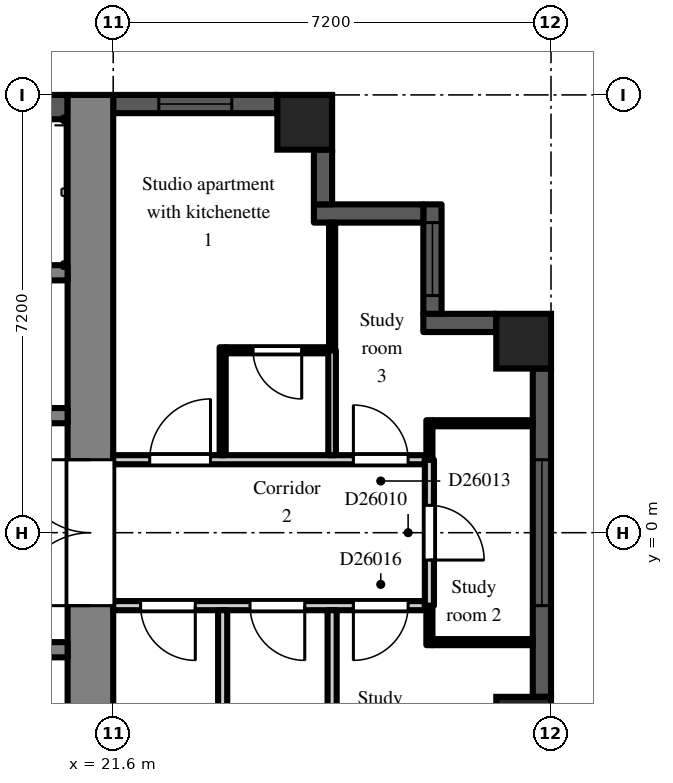
"""IFC4 building model, lengths in metres.
Left out: names, types, materials, properties, quantities, classifications, styles, units other than length and angle.
Written with IfcOpenShell. Run it as: python <this file> out.ifc"""

import sys

from ifc_helpers import new_model, si_unit, direction, frame, frame_2d, origin, origin_2d, place, context, subcontext, project, spatial, rectangle, extrude, element, fill, save


model = new_model("IFC4")
c1 = context("Model", 3, precision=1e-05, world=origin(), true_north=direction((0.0, 1.0)))
c2 = subcontext(c1, "Body", "Model", "MODEL_VIEW")
j1 = project(units=[si_unit("LENGTHUNIT", "METRE"), si_unit("PLANEANGLEUNIT", "RADIAN")], contexts=[c1])
p1 = place(None, origin())
s1 = spatial("IfcSite", under=j1, at=p1, CompositionType="ELEMENT")
p2 = place(p1, origin())
s2 = spatial("IfcBuilding", under=s1, at=p2, CompositionType="ELEMENT")
p3 = place(p2, frame((0.0, 0.0, 179.7)))
s3 = spatial("IfcBuildingStorey", under=s2, at=p3, CompositionType="ELEMENT", Elevation=179.7)
for number, where, z_axis, x_axis in (
    (1, (24.75, 6.75, 0.0), (0.0, 0.0, 1.0), (1.0, 0.0, 0.0)),
    (2, (28.35, -3.15, 0.0), (0.0, 0.0, 1.0), (1.0, 0.0, 0.0)),
    (3, (28.35, 3.15, 0.0), (0.0, 0.0, 1.0), (1.0, 0.0, 0.0)),
):
    element("IfcColumn", number, at=place(p3, frame(where, z_axis=z_axis, x_axis=x_axis)), inside=s3, PredefinedType="COLUMN", context=c2, shape_type="SweptSolid", body=[
        extrude(rectangle(XDim=0.9, YDim=0.9, at=origin_2d()), origin(), (0.0, 0.0, 1.0), 3.0),
    ])
p4 = place(p3, frame((28.65, -2.7, 0.0), z_axis=(0.0, 0.0, 1.0), x_axis=(0.0, 1.0, 0.0)))
e4 = element("IfcWall", 4, at=p4, inside=s3, PredefinedType="SOLIDWALL", context=c2, shape_type="SweptSolid", body=[
    extrude(rectangle(XDim=5.4, YDim=0.3, at=frame_2d((2.7, 0.0))), origin(), (0.0, 0.0, 1.0), 2.2),
])
p5 = place(p4, frame((1.5, 0.0, 0.2)))
e5 = element("IfcOpeningElement", 5, at=p5, cuts=e4, PredefinedType="OPENING", context=c2, shape_type="SweptSolid", body=[
    extrude(rectangle(XDim=2.4, YDim=1.85, at=frame_2d((1.2, 0.925))), frame((0.0, 0.16, 0.0), z_axis=(0.0, -1.0, 0.0), x_axis=(1.0, 0.0, 0.0)), (0.0, 0.0, 1.0), 0.32),
])
p6 = place(p3, frame((27.9, 3.45, 0.0), z_axis=(0.0, 0.0, 1.0), x_axis=(-1.0, 0.0, 0.0)))
e6 = element("IfcWall", 6, at=p6, inside=s3, PredefinedType="SOLIDWALL", context=c2, shape_type="SweptSolid", body=[
    extrude(rectangle(XDim=1.2, YDim=0.3, at=frame_2d((0.6, 0.0))), origin(), (0.0, 0.0, 1.0), 2.6),
])
p7 = place(p3, frame((26.85, 3.6, 0.0), z_axis=(0.0, 0.0, 1.0), x_axis=(0.0, 1.0, 0.0)))
e7 = element("IfcWall", 7, at=p7, inside=s3, PredefinedType="SOLIDWALL", context=c2, shape_type="SweptSolid", body=[
    extrude(rectangle(XDim=1.8, YDim=0.3, at=frame_2d((0.9, 0.0))), origin(), (0.0, 0.0, 1.0), 2.6),
])
p8 = place(p7, frame((0.3, 0.0, 0.2)))
e8 = element("IfcOpeningElement", 8, at=p8, cuts=e7, PredefinedType="OPENING", context=c2, shape_type="SweptSolid", body=[
    extrude(rectangle(XDim=1.2, YDim=1.85, at=frame_2d((0.6, 0.925))), frame((0.0, 0.16, 0.0), z_axis=(0.0, -1.0, 0.0), x_axis=(1.0, 0.0, 0.0)), (0.0, 0.0, 1.0), 0.32),
])
p9 = place(p3, frame((26.7, 5.25, 0.0), z_axis=(0.0, 0.0, 1.0), x_axis=(-1.0, 0.0, 0.0)))
e9 = element("IfcWall", 9, at=p9, inside=s3, PredefinedType="SOLIDWALL", context=c2, shape_type="SweptSolid", body=[
    extrude(rectangle(XDim=1.8, YDim=0.3, at=frame_2d((0.9, 0.0))), origin(), (0.0, 0.0, 1.0), 2.6),
])
p10 = place(p3, frame((25.05, 5.4, 0.0), z_axis=(0.0, 0.0, 1.0), x_axis=(0.0, 1.0, 0.0)))
e10 = element("IfcWall", 10, at=p10, inside=s3, PredefinedType="SOLIDWALL", context=c2, shape_type="SweptSolid", body=[
    extrude(rectangle(XDim=0.9, YDim=0.3, at=frame_2d((0.45, 0.0))), origin(), (0.0, 0.0, 1.0), 2.6),
])
p11 = place(p3, frame((24.3, 7.05, 0.0), z_axis=(0.0, 0.0, 1.0), x_axis=(-1.0, 0.0, 0.0)))
e11 = element("IfcWall", 11, at=p11, inside=s3, PredefinedType="SOLIDWALL", context=c2, shape_type="SweptSolid", body=[
    extrude(rectangle(XDim=2.7, YDim=0.3, at=frame_2d((1.35, 0.0))), origin(), (0.0, 0.0, 1.0), 2.2),
])
p12 = place(p11, frame((0.75, 0.0, 0.2)))
e12 = element("IfcOpeningElement", 12, at=p12, cuts=e11, PredefinedType="OPENING", context=c2, shape_type="SweptSolid", body=[
    extrude(rectangle(XDim=1.2, YDim=1.85, at=frame_2d((0.6, 0.925))), frame((0.0, 0.16, 0.0), z_axis=(0.0, -1.0, 0.0), x_axis=(1.0, 0.0, 0.0)), (0.0, 0.0, 1.0), 0.32),
])
p13 = place(p3, frame((21.225, -7.2, 0.0), z_axis=(0.0, 0.0, 1.0), x_axis=(0.0, 1.0, 0.0)))
e13 = element("IfcWall", 13, at=p13, inside=s3, PredefinedType="SHEAR", context=c2, shape_type="SweptSolid", body=[
    extrude(rectangle(XDim=14.4, YDim=0.75, at=frame_2d((7.2, 0.0))), origin(), (0.0, 0.0, 1.0), 2.6),
])
p14 = place(p13, frame((6.0, 0.0, 0.0)))
e14 = element("IfcOpeningElement", 14, at=p14, cuts=e13, PredefinedType="OPENING", context=c2, shape_type="SweptSolid", body=[
    extrude(rectangle(XDim=2.4, YDim=2.2, at=frame_2d((1.2, 1.1))), frame((0.0, 0.385, 0.0), z_axis=(0.0, -1.0, 0.0), x_axis=(1.0, 0.0, 0.0)), (0.0, 0.0, 1.0), 0.77),
])
p15 = place(p3, frame((7.9, 7.0, 0.0), z_axis=(0.0, 0.0, 1.0), x_axis=(1.0, 0.0, 0.0)))
e15 = element("IfcWall", 15, at=p15, inside=s3, PredefinedType="SHEAR", context=c2, shape_type="SweptSolid", body=[
    extrude(rectangle(XDim=12.95, YDim=0.4, at=frame_2d((6.475, 0.0))), origin(), (0.0, 0.0, 1.0), 2.6),
])
p16 = place(p3, frame((7.9, 1.925, 0.0), z_axis=(0.0, 0.0, 1.0), x_axis=(1.0, 0.0, 0.0)))
e16 = element("IfcWall", 16, at=p16, inside=s3, PredefinedType="SHEAR", context=c2, shape_type="SweptSolid", body=[
    extrude(rectangle(XDim=12.95, YDim=0.25, at=frame_2d((6.475, 0.0))), origin(), (0.0, 0.0, 1.0), 2.6),
])
p17 = place(p16, frame((4.825, 0.0, 0.0)))
e17 = element("IfcOpeningElement", 17, at=p17, cuts=e16, PredefinedType="OPENING", context=c2, shape_type="SweptSolid", body=[
    extrude(rectangle(XDim=1.1, YDim=2.1, at=frame_2d((0.55, 1.05))), frame((0.0, 0.135, 0.0), z_axis=(0.0, -1.0, 0.0), x_axis=(1.0, 0.0, 0.0)), (0.0, 0.0, 1.0), 0.27),
])
p18 = place(p16, frame((7.025, 0.0, 0.0)))
e18 = element("IfcOpeningElement", 18, at=p18, cuts=e16, PredefinedType="OPENING", context=c2, shape_type="SweptSolid", body=[
    extrude(rectangle(XDim=1.1, YDim=2.1, at=frame_2d((0.55, 1.05))), frame((0.0, 0.135, 0.0), z_axis=(0.0, -1.0, 0.0), x_axis=(1.0, 0.0, 0.0)), (0.0, 0.0, 1.0), 0.27),
])
p19 = place(p16, frame((9.225, 0.0, 0.0)))
e19 = element("IfcOpeningElement", 19, at=p19, cuts=e16, PredefinedType="OPENING", context=c2, shape_type="SweptSolid", body=[
    extrude(rectangle(XDim=1.1, YDim=2.1, at=frame_2d((0.55, 1.05))), frame((0.0, 0.135, 0.0), z_axis=(0.0, -1.0, 0.0), x_axis=(1.0, 0.0, 0.0)), (0.0, 0.0, 1.0), 0.27),
])
p20 = place(p16, frame((0.525, 0.0, 0.0)))
e20 = element("IfcOpeningElement", 20, at=p20, cuts=e16, PredefinedType="OPENING", context=c2, shape_type="SweptSolid", body=[
    extrude(rectangle(XDim=0.9, YDim=2.1, at=frame_2d((0.45, 1.05))), frame((0.0, 0.135, 0.0), z_axis=(0.0, -1.0, 0.0), x_axis=(1.0, 0.0, 0.0)), (0.0, 0.0, 1.0), 0.27),
])
p21 = place(p16, frame((2.625, 0.0, 0.0)))
e21 = element("IfcOpeningElement", 21, at=p21, cuts=e16, PredefinedType="OPENING", context=c2, shape_type="SweptSolid", body=[
    extrude(rectangle(XDim=1.1, YDim=2.1, at=frame_2d((0.55, 1.05))), frame((0.0, 0.135, 0.0), z_axis=(0.0, -1.0, 0.0), x_axis=(1.0, 0.0, 0.0)), (0.0, 0.0, 1.0), 0.27),
])
p22 = place(p16, frame((11.525, 0.0, 0.0)))
e22 = element("IfcOpeningElement", 22, at=p22, cuts=e16, PredefinedType="OPENING", context=c2, shape_type="SweptSolid", body=[
    extrude(rectangle(XDim=0.9, YDim=2.1, at=frame_2d((0.45, 1.05))), frame((0.0, 0.135, 0.0), z_axis=(0.0, -1.0, 0.0), x_axis=(1.0, 0.0, 0.0)), (0.0, 0.0, 1.0), 0.27),
])
p23 = place(p3, frame((12.3, 4.275, 0.0), z_axis=(0.0, 0.0, 1.0), x_axis=(1.0, 0.0, 0.0)))
e23 = element("IfcWall", 23, at=p23, inside=s3, PredefinedType="SHEAR", context=c2, shape_type="SweptSolid", body=[
    extrude(rectangle(XDim=8.55, YDim=0.25, at=frame_2d((4.275, 0.0))), origin(), (0.0, 0.0, 1.0), 2.6),
])
p24 = place(p3, frame((7.9, -1.925, 0.0), z_axis=(0.0, 0.0, 1.0), x_axis=(1.0, 0.0, 0.0)))
e24 = element("IfcWall", 24, at=p24, inside=s3, PredefinedType="SHEAR", context=c2, shape_type="SweptSolid", body=[
    extrude(rectangle(XDim=12.95, YDim=0.25, at=frame_2d((6.475, 0.0))), origin(), (0.0, 0.0, 1.0), 2.6),
])
p25 = place(p24, frame((0.525, 0.0, 0.0)))
e25 = element("IfcOpeningElement", 25, at=p25, cuts=e24, PredefinedType="OPENING", context=c2, shape_type="SweptSolid", body=[
    extrude(rectangle(XDim=0.9, YDim=2.1, at=frame_2d((0.45, 1.05))), frame((0.0, 0.135, 0.0), z_axis=(0.0, -1.0, 0.0), x_axis=(1.0, 0.0, 0.0)), (0.0, 0.0, 1.0), 0.27),
])
p26 = place(p24, frame((2.625, 0.0, 0.0)))
e26 = element("IfcOpeningElement", 26, at=p26, cuts=e24, PredefinedType="OPENING", context=c2, shape_type="SweptSolid", body=[
    extrude(rectangle(XDim=1.1, YDim=2.1, at=frame_2d((0.55, 1.05))), frame((0.0, 0.135, 0.0), z_axis=(0.0, -1.0, 0.0), x_axis=(1.0, 0.0, 0.0)), (0.0, 0.0, 1.0), 0.27),
])
p27 = place(p24, frame((4.925, 0.0, 0.0)))
e27 = element("IfcOpeningElement", 27, at=p27, cuts=e24, PredefinedType="OPENING", context=c2, shape_type="SweptSolid", body=[
    extrude(rectangle(XDim=0.9, YDim=2.1, at=frame_2d((0.45, 1.05))), frame((0.0, 0.135, 0.0), z_axis=(0.0, -1.0, 0.0), x_axis=(1.0, 0.0, 0.0)), (0.0, 0.0, 1.0), 0.27),
])
p28 = place(p24, frame((8.225, 0.0, 0.0)))
e28 = element("IfcOpeningElement", 28, at=p28, cuts=e24, PredefinedType="OPENING", context=c2, shape_type="SweptSolid", body=[
    extrude(rectangle(XDim=0.9, YDim=2.1, at=frame_2d((0.45, 1.05))), frame((0.0, 0.135, 0.0), z_axis=(0.0, -1.0, 0.0), x_axis=(1.0, 0.0, 0.0)), (0.0, 0.0, 1.0), 0.27),
])
p29 = place(p24, frame((11.525, 0.0, 0.0)))
e29 = element("IfcOpeningElement", 29, at=p29, cuts=e24, PredefinedType="OPENING", context=c2, shape_type="SweptSolid", body=[
    extrude(rectangle(XDim=0.9, YDim=2.1, at=frame_2d((0.45, 1.05))), frame((0.0, 0.135, 0.0), z_axis=(0.0, -1.0, 0.0), x_axis=(1.0, 0.0, 0.0)), (0.0, 0.0, 1.0), 0.27),
])
p30 = place(p3, frame((21.6, -1.2, 0.0), z_axis=(0.0, 0.0, 1.0), x_axis=(1.0, 0.0, 0.0)))
e30 = element("IfcWall", 30, at=p30, inside=s3, PredefinedType="PARTITIONING", context=c2, shape_type="SweptSolid", body=[
    extrude(rectangle(XDim=5.125, YDim=0.15, at=frame_2d((2.562, 0.0))), origin(), (0.0, 0.0, 1.0), 2.6),
])
p31 = place(p30, frame((0.45, 0.0, 0.0)))
e31 = element("IfcOpeningElement", 31, at=p31, cuts=e30, PredefinedType="OPENING", context=c2, shape_type="SweptSolid", body=[
    extrude(rectangle(XDim=0.9, YDim=2.1, at=frame_2d((0.45, 1.05))), frame((0.0, 0.085, 0.0), z_axis=(0.0, -1.0, 0.0), x_axis=(1.0, 0.0, 0.0)), (0.0, 0.0, 1.0), 0.17),
])
p32 = place(p30, frame((2.25, 0.0, 0.0)))
e32 = element("IfcOpeningElement", 32, at=p32, cuts=e30, PredefinedType="OPENING", context=c2, shape_type="SweptSolid", body=[
    extrude(rectangle(XDim=0.9, YDim=2.1, at=frame_2d((0.45, 1.05))), frame((0.0, 0.085, 0.0), z_axis=(0.0, -1.0, 0.0), x_axis=(1.0, 0.0, 0.0)), (0.0, 0.0, 1.0), 0.17),
])
p33 = place(p30, frame((3.95, 0.0, 0.0)))
e33 = element("IfcOpeningElement", 33, at=p33, cuts=e30, PredefinedType="OPENING", context=c2, shape_type="SweptSolid", body=[
    extrude(rectangle(XDim=0.9, YDim=2.1, at=frame_2d((0.45, 1.05))), frame((0.0, 0.085, 0.0), z_axis=(0.0, -1.0, 0.0), x_axis=(1.0, 0.0, 0.0)), (0.0, 0.0, 1.0), 0.17),
])
p34 = place(p3, frame((21.6, 1.2, 0.0), z_axis=(0.0, 0.0, 1.0), x_axis=(1.0, 0.0, 0.0)))
e34 = element("IfcWall", 34, at=p34, inside=s3, PredefinedType="PARTITIONING", context=c2, shape_type="SweptSolid", body=[
    extrude(rectangle(XDim=5.125, YDim=0.15, at=frame_2d((2.562, 0.0))), origin(), (0.0, 0.0, 1.0), 2.6),
])
p35 = place(p34, frame((0.6, 0.0, 0.0)))
e35 = element("IfcOpeningElement", 35, at=p35, cuts=e34, PredefinedType="OPENING", context=c2, shape_type="SweptSolid", body=[
    extrude(rectangle(XDim=1.0, YDim=2.1, at=frame_2d((0.5, 1.05))), frame((0.0, 0.085, 0.0), z_axis=(0.0, -1.0, 0.0), x_axis=(1.0, 0.0, 0.0)), (0.0, 0.0, 1.0), 0.17),
])
p36 = place(p34, frame((3.95, 0.0, 0.0)))
e36 = element("IfcOpeningElement", 36, at=p36, cuts=e34, PredefinedType="OPENING", context=c2, shape_type="SweptSolid", body=[
    extrude(rectangle(XDim=0.9, YDim=2.1, at=frame_2d((0.45, 1.05))), frame((0.0, 0.085, 0.0), z_axis=(0.0, -1.0, 0.0), x_axis=(1.0, 0.0, 0.0)), (0.0, 0.0, 1.0), 0.17),
])
p37 = place(p3, frame((23.4, -6.9, 0.0), z_axis=(0.0, 0.0, 1.0), x_axis=(0.0, 1.0, 0.0)))
e37 = element("IfcWall", 37, at=p37, inside=s3, PredefinedType="PARTITIONING", context=c2, shape_type="SweptSolid", body=[
    extrude(rectangle(XDim=5.625, YDim=0.15, at=frame_2d((2.812, 0.0))), origin(), (0.0, 0.0, 1.0), 2.6),
])
p38 = place(p3, frame((23.4, 1.275, 0.0), z_axis=(0.0, 0.0, 1.0), x_axis=(0.0, 1.0, 0.0)))
e38 = element("IfcWall", 38, at=p38, inside=s3, PredefinedType="PARTITIONING", context=c2, shape_type="SweptSolid", body=[
    extrude(rectangle(XDim=1.775, YDim=0.1, at=frame_2d((0.888, 0.0))), origin(), (0.0, 0.0, 1.0), 2.6),
])
p39 = place(p3, frame((23.45, 3.0, 0.0), z_axis=(0.0, 0.0, 1.0), x_axis=(1.0, 0.0, 0.0)))
e39 = element("IfcWall", 39, at=p39, inside=s3, PredefinedType="PARTITIONING", context=c2, shape_type="SweptSolid", body=[
    extrude(rectangle(XDim=1.688, YDim=0.1, at=frame_2d((0.844, 0.0))), origin(), (0.0, 0.0, 1.0), 2.6),
])
p40 = place(p39, frame((0.45, 0.0, 0.0)))
e40 = element("IfcOpeningElement", 40, at=p40, cuts=e39, PredefinedType="OPENING", context=c2, shape_type="SweptSolid", body=[
    extrude(rectangle(XDim=0.8, YDim=2.1, at=frame_2d((0.4, 1.05))), frame((0.0, 0.06, 0.0), z_axis=(0.0, -1.0, 0.0), x_axis=(1.0, 0.0, 0.0)), (0.0, 0.0, 1.0), 0.12),
])
p41 = place(p3, frame((25.2, -5.1, 0.0), z_axis=(0.0, 0.0, 1.0), x_axis=(0.0, 1.0, 0.0)))
e41 = element("IfcWall", 41, at=p41, inside=s3, PredefinedType="PARTITIONING", context=c2, shape_type="SweptSolid", body=[
    extrude(rectangle(XDim=3.825, YDim=0.15, at=frame_2d((1.913, 0.0))), origin(), (0.0, 0.0, 1.0), 2.6),
])
p42 = place(p3, frame((25.2, 1.275, 0.0), z_axis=(0.0, 0.0, 1.0), x_axis=(0.0, 1.0, 0.0)))
e42 = element("IfcWall", 42, at=p42, inside=s3, PredefinedType="PARTITIONING", context=c2, shape_type="SweptSolid", body=[
    extrude(rectangle(XDim=1.725, YDim=0.125, at=frame_2d((0.863, 0.0))), origin(), (0.0, 0.0, 1.0), 2.6),
])
p43 = place(p3, frame((25.2, 3.0, 0.0), z_axis=(0.0, 0.0, 1.0), x_axis=(0.0, 1.0, 0.0)))
e43 = element("IfcWall", 43, at=p43, inside=s3, PredefinedType="PARTITIONING", context=c2, shape_type="SweptSolid", body=[
    extrude(rectangle(XDim=2.1, YDim=0.1, at=frame_2d((1.05, 0.0))), origin(), (0.0, 0.0, 1.0), 2.6),
])
p44 = place(p3, frame((26.8, -1.85, 0.0), z_axis=(0.0, 0.0, 1.0), x_axis=(0.0, 1.0, 0.0)))
e44 = element("IfcWall", 44, at=p44, inside=s3, PredefinedType="PARTITIONING", context=c2, shape_type="SweptSolid", body=[
    extrude(rectangle(XDim=0.65, YDim=0.1, at=frame_2d((0.325, 0.0))), origin(), (0.0, 0.0, 1.0), 2.6),
])
p45 = place(p3, frame((26.85, -1.8, 0.0), z_axis=(0.0, 0.0, 1.0), x_axis=(1.0, 0.0, 0.0)))
e45 = element("IfcWall", 45, at=p45, inside=s3, PredefinedType="PARTITIONING", context=c2, shape_type="SweptSolid", body=[
    extrude(rectangle(XDim=1.65, YDim=0.1, at=frame_2d((0.825, 0.0))), origin(), (0.0, 0.0, 1.0), 2.6),
])
p46 = place(p3, frame((26.8, -1.2, 0.0), z_axis=(0.0, 0.0, 1.0), x_axis=(0.0, 1.0, 0.0)))
e46 = element("IfcWall", 46, at=p46, inside=s3, PredefinedType="PARTITIONING", context=c2, shape_type="SweptSolid", body=[
    extrude(rectangle(XDim=2.4, YDim=0.15, at=frame_2d((1.2, 0.0))), origin(), (0.0, 0.0, 1.0), 2.6),
])
p47 = place(p46, frame((0.75, 0.0, 0.0)))
e47 = element("IfcOpeningElement", 47, at=p47, cuts=e46, PredefinedType="OPENING", context=c2, shape_type="SweptSolid", body=[
    extrude(rectangle(XDim=0.9, YDim=2.1, at=frame_2d((0.45, 1.05))), frame((0.0, 0.085, 0.0), z_axis=(0.0, -1.0, 0.0), x_axis=(1.0, 0.0, 0.0)), (0.0, 0.0, 1.0), 0.17),
])
p48 = place(p3, frame((26.8, 1.2, 0.0), z_axis=(0.0, 0.0, 1.0), x_axis=(0.0, 1.0, 0.0)))
e48 = element("IfcWall", 48, at=p48, inside=s3, PredefinedType="PARTITIONING", context=c2, shape_type="SweptSolid", body=[
    extrude(rectangle(XDim=0.65, YDim=0.1, at=frame_2d((0.325, 0.0))), origin(), (0.0, 0.0, 1.0), 2.6),
])
p49 = place(p3, frame((26.85, 1.8, 0.0), z_axis=(0.0, 0.0, 1.0), x_axis=(1.0, 0.0, 0.0)))
e49 = element("IfcWall", 49, at=p49, inside=s3, PredefinedType="PARTITIONING", context=c2, shape_type="SweptSolid", body=[
    extrude(rectangle(XDim=1.65, YDim=0.1, at=frame_2d((0.825, 0.0))), origin(), (0.0, 0.0, 1.0), 2.6),
])
p50 = place(p5, origin())
e50 = element("IfcWindow", 50, at=p50, inside=s3, PartitioningType="SINGLE_PANEL", PredefinedType="WINDOW", context=c2, shape_type="SweptSolid", body=[
    extrude(rectangle(XDim=2.4, YDim=1.85, at=frame_2d((1.2, 0.925))), frame((0.0, 0.03, 0.0), z_axis=(0.0, -1.0, 0.0), x_axis=(1.0, 0.0, 0.0)), (0.0, 0.0, 1.0), 0.06),
])
fill(e5, e50)
p51 = place(p8, origin())
e51 = element("IfcWindow", 51, at=p51, inside=s3, PartitioningType="SINGLE_PANEL", PredefinedType="WINDOW", context=c2, shape_type="SweptSolid", body=[
    extrude(rectangle(XDim=1.2, YDim=1.85, at=frame_2d((0.6, 0.925))), frame((0.0, 0.03, 0.0), z_axis=(0.0, -1.0, 0.0), x_axis=(1.0, 0.0, 0.0)), (0.0, 0.0, 1.0), 0.06),
])
fill(e8, e51)
p52 = place(p12, origin())
e52 = element("IfcWindow", 52, at=p52, inside=s3, PartitioningType="SINGLE_PANEL", PredefinedType="WINDOW", context=c2, shape_type="SweptSolid", body=[
    extrude(rectangle(XDim=1.2, YDim=1.85, at=frame_2d((0.6, 0.925))), frame((0.0, 0.03, 0.0), z_axis=(0.0, -1.0, 0.0), x_axis=(1.0, 0.0, 0.0)), (0.0, 0.0, 1.0), 0.06),
])
fill(e12, e52)
p53 = place(p14, origin())
e53 = element("IfcDoor", 53, at=p53, inside=s3, OperationType="DOUBLE_DOOR_DOUBLE_SWING", PredefinedType="DOOR", context=c2, shape_type="SweptSolid", body=[
    extrude(rectangle(XDim=2.4, YDim=2.2, at=frame_2d((1.2, 1.1))), frame((0.0, 0.025, 0.0), z_axis=(0.0, -1.0, 0.0), x_axis=(1.0, 0.0, 0.0)), (0.0, 0.0, 1.0), 0.05),
])
fill(e14, e53)
p54 = place(p47, frame((0.9, 0.0, 0.0), z_axis=(0.0, 0.0, 1.0), x_axis=(-1.0, 0.0, 0.0)))
e54 = element("IfcDoor", 54, at=p54, inside=s3, OperationType="SINGLE_SWING_RIGHT", PredefinedType="DOOR", context=c2, shape_type="SweptSolid", body=[
    extrude(rectangle(XDim=0.9, YDim=2.1, at=frame_2d((0.45, 1.05))), frame((0.0, 0.025, 0.0), z_axis=(0.0, -1.0, 0.0), x_axis=(1.0, 0.0, 0.0)), (0.0, 0.0, 1.0), 0.05),
])
fill(e47, e54)
p55 = place(p40, frame((0.8, 0.0, 0.0), z_axis=(0.0, 0.0, 1.0), x_axis=(-1.0, 0.0, 0.0)))
e55 = element("IfcDoor", 55, at=p55, inside=s3, OperationType="SINGLE_SWING_LEFT", PredefinedType="DOOR", context=c2, shape_type="SweptSolid", body=[
    extrude(rectangle(XDim=0.8, YDim=2.1, at=frame_2d((0.4, 1.05))), frame((0.0, 0.025, 0.0), z_axis=(0.0, -1.0, 0.0), x_axis=(1.0, 0.0, 0.0)), (0.0, 0.0, 1.0), 0.05),
])
fill(e40, e55)
p56 = place(p35, origin())
e56 = element("IfcDoor", 56, at=p56, inside=s3, OperationType="SINGLE_SWING_RIGHT", PredefinedType="DOOR", context=c2, shape_type="SweptSolid", body=[
    extrude(rectangle(XDim=1.0, YDim=2.1, at=frame_2d((0.5, 1.05))), frame((0.0, 0.025, 0.0), z_axis=(0.0, -1.0, 0.0), x_axis=(1.0, 0.0, 0.0)), (0.0, 0.0, 1.0), 0.05),
])
fill(e35, e56)
p57 = place(p36, origin())
e57 = element("IfcDoor", 57, at=p57, inside=s3, OperationType="SINGLE_SWING_LEFT", PredefinedType="DOOR", context=c2, shape_type="SweptSolid", body=[
    extrude(rectangle(XDim=0.9, YDim=2.1, at=frame_2d((0.45, 1.05))), frame((0.0, 0.025, 0.0), z_axis=(0.0, -1.0, 0.0), x_axis=(1.0, 0.0, 0.0)), (0.0, 0.0, 1.0), 0.05),
])
fill(e36, e57)
p58 = place(p31, frame((0.9, 0.0, 0.0), z_axis=(0.0, 0.0, 1.0), x_axis=(-1.0, 0.0, 0.0)))
e58 = element("IfcDoor", 58, at=p58, inside=s3, OperationType="SINGLE_SWING_LEFT", PredefinedType="DOOR", context=c2, shape_type="SweptSolid", body=[
    extrude(rectangle(XDim=0.9, YDim=2.1, at=frame_2d((0.45, 1.05))), frame((0.0, 0.025, 0.0), z_axis=(0.0, -1.0, 0.0), x_axis=(1.0, 0.0, 0.0)), (0.0, 0.0, 1.0), 0.05),
])
fill(e31, e58)
p59 = place(p32, frame((0.9, 0.0, 0.0), z_axis=(0.0, 0.0, 1.0), x_axis=(-1.0, 0.0, 0.0)))
e59 = element("IfcDoor", 59, at=p59, inside=s3, OperationType="SINGLE_SWING_LEFT", PredefinedType="DOOR", context=c2, shape_type="SweptSolid", body=[
    extrude(rectangle(XDim=0.9, YDim=2.1, at=frame_2d((0.45, 1.05))), frame((0.0, 0.025, 0.0), z_axis=(0.0, -1.0, 0.0), x_axis=(1.0, 0.0, 0.0)), (0.0, 0.0, 1.0), 0.05),
])
fill(e32, e59)
p60 = place(p33, frame((0.9, 0.0, 0.0), z_axis=(0.0, 0.0, 1.0), x_axis=(-1.0, 0.0, 0.0)))
e60 = element("IfcDoor", 60, at=p60, inside=s3, OperationType="SINGLE_SWING_RIGHT", PredefinedType="DOOR", context=c2, shape_type="SweptSolid", body=[
    extrude(rectangle(XDim=0.9, YDim=2.1, at=frame_2d((0.45, 1.05))), frame((0.0, 0.025, 0.0), z_axis=(0.0, -1.0, 0.0), x_axis=(1.0, 0.0, 0.0)), (0.0, 0.0, 1.0), 0.05),
])
fill(e33, e60)
save(model, sys.argv[1])
